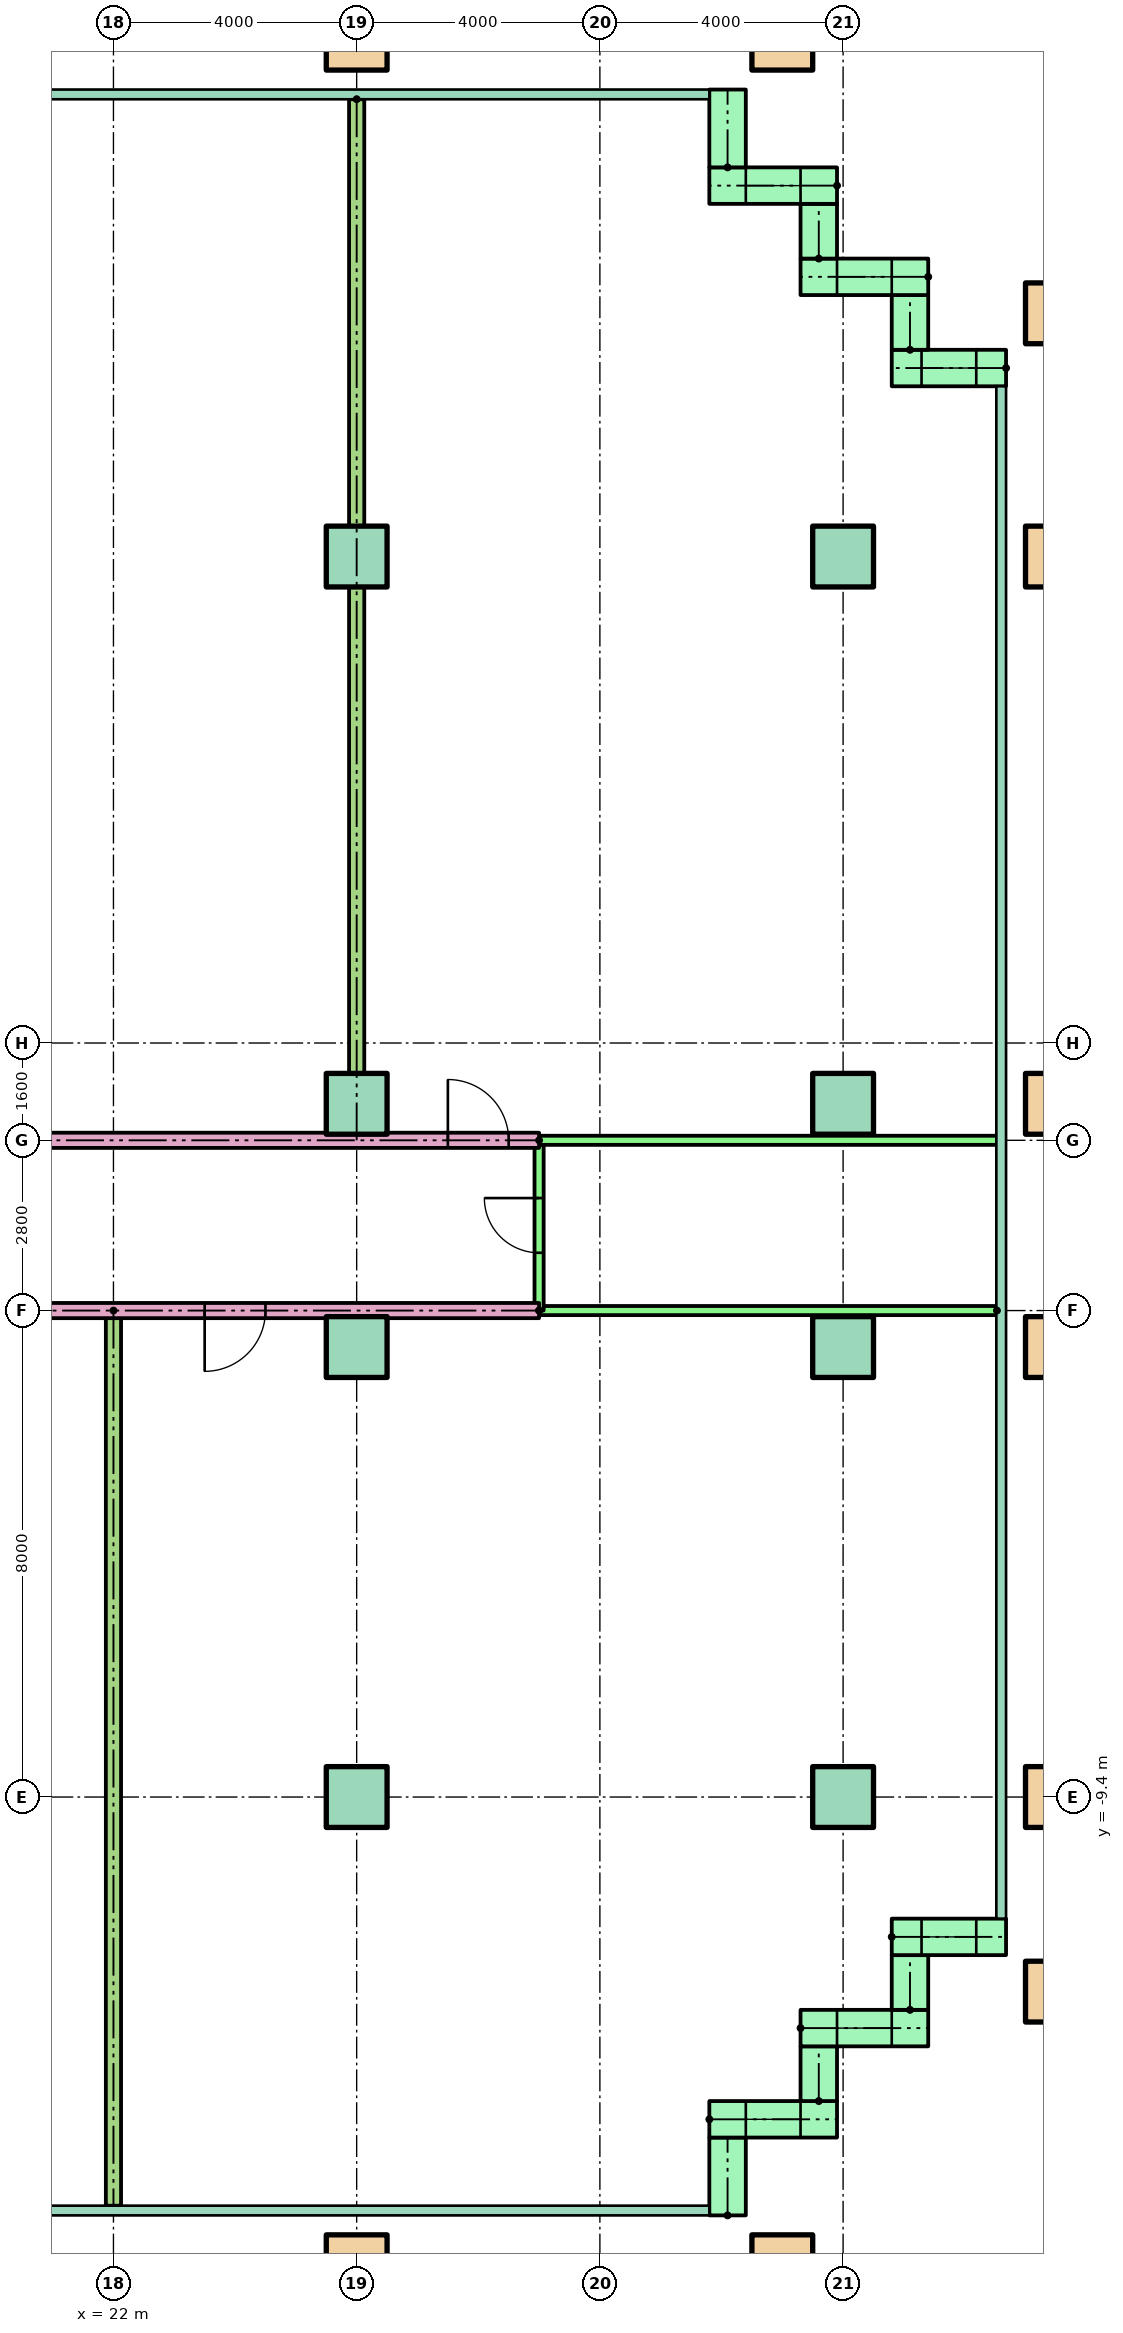
"""IFC4 building model, lengths in metres.
Left out: names, types, materials, properties, quantities, classifications, styles, units other than length and angle.
Written with IfcOpenShell. Run it as: python <this file> out.ifc"""

import sys

from ifc_helpers import new_model, si_unit, direction, frame, frame_2d, origin, origin_2d, place, context, subcontext, project, spatial, rectangle, hollow_rectangle, extrude, element, fill, save


model = new_model("IFC4")
c1 = context("Model", 3, precision=1e-05, world=origin(), true_north=direction((0.0, 1.0)))
c2 = subcontext(c1, "Body", "Model", "MODEL_VIEW")
j1 = project(units=[si_unit("LENGTHUNIT", "METRE"), si_unit("PLANEANGLEUNIT", "RADIAN")], contexts=[c1])
p1 = place(None, origin())
s1 = spatial("IfcSite", under=j1, at=p1, CompositionType="ELEMENT")
p2 = place(p1, origin())
s2 = spatial("IfcBuilding", under=s1, at=p2, CompositionType="ELEMENT")
p3 = place(p2, frame((0.0, 0.0, 29.9)))
s3 = spatial("IfcBuildingStorey", under=s2, at=p3, CompositionType="ELEMENT", Elevation=29.9)
for number, where in (
    (1, (26.0, -17.1, 0.0)),
    (2, (33.0, -17.1, 0.0)),
    (3, (37.5, -12.6, 0.0)),
):
    element("IfcColumn", number, at=place(p3, frame(where)), inside=s3, PredefinedType="COLUMN", context=c2, shape_type="SweptSolid", body=[
        extrude(hollow_rectangle(XDim=1.0, YDim=1.0, WallThickness=0.05, at=origin_2d()), origin(), (0.0, 0.0, 1.0), 3.9),
    ])
for number, where in (
    (4, (26.0, -9.4, 0.0)),
    (5, (34.0, -9.4, 0.0)),
):
    element("IfcColumn", number, at=place(p3, frame(where)), inside=s3, PredefinedType="COLUMN", context=c2, shape_type="SweptSolid", body=[
        extrude(rectangle(XDim=1.0, YDim=1.0, at=origin_2d()), origin(), (0.0, 0.0, 1.0), 3.9),
    ])
p4 = place(p3, frame((37.5, -9.4, 0.0)))
e6 = element("IfcColumn", 6, at=p4, inside=s3, PredefinedType="COLUMN", context=c2, shape_type="SweptSolid", body=[
    extrude(hollow_rectangle(XDim=1.0, YDim=1.0, WallThickness=0.05, at=origin_2d()), origin(), (0.0, 0.0, 1.0), 3.9),
])
for number, where in (
    (7, (26.0, -2.0, 0.0)),
    (8, (34.0, -2.0, 0.0)),
):
    element("IfcColumn", number, at=place(p3, frame(where)), inside=s3, PredefinedType="COLUMN", context=c2, shape_type="SweptSolid", body=[
        extrude(rectangle(XDim=1.0, YDim=1.0, at=origin_2d()), origin(), (0.0, 0.0, 1.0), 3.9),
    ])
p5 = place(p3, frame((37.5, -2.0, 0.0)))
e9 = element("IfcColumn", 9, at=p5, inside=s3, PredefinedType="COLUMN", context=c2, shape_type="SweptSolid", body=[
    extrude(hollow_rectangle(XDim=1.0, YDim=1.0, WallThickness=0.05, at=origin_2d()), origin(), (0.0, 0.0, 1.0), 3.9),
])
for number, where in (
    (10, (26.0, 2.0, 0.0)),
    (11, (34.0, 2.0, 0.0)),
):
    element("IfcColumn", number, at=place(p3, frame(where)), inside=s3, PredefinedType="COLUMN", context=c2, shape_type="SweptSolid", body=[
        extrude(rectangle(XDim=1.0, YDim=1.0, at=origin_2d()), origin(), (0.0, 0.0, 1.0), 3.9),
    ])
p6 = place(p3, frame((37.5, 2.0, 0.0)))
e12 = element("IfcColumn", 12, at=p6, inside=s3, PredefinedType="COLUMN", context=c2, shape_type="SweptSolid", body=[
    extrude(hollow_rectangle(XDim=1.0, YDim=1.0, WallThickness=0.05, at=origin_2d()), origin(), (0.0, 0.0, 1.0), 3.9),
])
for number, where in (
    (13, (26.0, 11.0, 0.0)),
    (14, (34.0, 11.0, 0.0)),
):
    element("IfcColumn", number, at=place(p3, frame(where)), inside=s3, PredefinedType="COLUMN", context=c2, shape_type="SweptSolid", body=[
        extrude(rectangle(XDim=1.0, YDim=1.0, at=origin_2d()), origin(), (0.0, 0.0, 1.0), 3.9),
    ])
for number, where in (
    (15, (37.5, 11.0, 0.0)),
    (16, (37.5, 15.0, 0.0)),
    (17, (26.0, 19.5, 0.0)),
    (18, (33.0, 19.5, 0.0)),
):
    element("IfcColumn", number, at=place(p3, frame(where)), inside=s3, PredefinedType="COLUMN", context=c2, shape_type="SweptSolid", body=[
        extrude(hollow_rectangle(XDim=1.0, YDim=1.0, WallThickness=0.05, at=origin_2d()), origin(), (0.0, 0.0, 1.0), 3.9),
    ])
p7 = place(p3, frame((36.68, 14.1, 0.0), z_axis=(0.0, 0.0, 1.0), x_axis=(-1.0, 0.0, 0.0)))
e19 = element("IfcWall", 19, at=p7, inside=s3, PredefinedType="STANDARD", context=c2, shape_type="SweptSolid", body=[
    extrude(rectangle(XDim=1.88, YDim=0.6, at=frame_2d((0.94, 0.0))), origin(), (0.0, 0.0, 1.0), 3.6),
])
p8 = place(p7, frame((0.49, 0.0, 0.9)))
e20 = element("IfcOpeningElement", 20, at=p8, cuts=e19, PredefinedType="OPENING", context=c2, shape_type="SweptSolid", body=[
    extrude(rectangle(XDim=0.9, YDim=1.8, at=frame_2d((0.45, 0.9))), frame((0.0, 0.31, 0.0), z_axis=(0.0, -1.0, 0.0), x_axis=(1.0, 0.0, 0.0)), (0.0, 0.0, 1.0), 0.62),
])
p9 = place(p3, frame((35.1, 14.4, 0.0), z_axis=(0.0, 0.0, 1.0), x_axis=(0.0, 1.0, 0.0)))
e21 = element("IfcWall", 21, at=p9, inside=s3, PredefinedType="STANDARD", context=c2, shape_type="SweptSolid", body=[
    extrude(rectangle(XDim=0.9, YDim=0.6, at=frame_2d((0.45, 0.0))), origin(), (0.0, 0.0, 1.0), 3.6),
])
p10 = place(p3, frame((35.4, 15.6, 0.0), z_axis=(0.0, 0.0, 1.0), x_axis=(-1.0, 0.0, 0.0)))
e22 = element("IfcWall", 22, at=p10, inside=s3, PredefinedType="STANDARD", context=c2, shape_type="SweptSolid", body=[
    extrude(rectangle(XDim=2.1, YDim=0.6, at=frame_2d((1.05, 0.0))), origin(), (0.0, 0.0, 1.0), 3.6),
])
p11 = place(p10, frame((0.6, 0.0, 0.9)))
e23 = element("IfcOpeningElement", 23, at=p11, cuts=e22, PredefinedType="OPENING", context=c2, shape_type="SweptSolid", body=[
    extrude(rectangle(XDim=0.9, YDim=1.8, at=frame_2d((0.45, 0.9))), frame((0.0, 0.31, 0.0), z_axis=(0.0, -1.0, 0.0), x_axis=(1.0, 0.0, 0.0)), (0.0, 0.0, 1.0), 0.62),
])
p12 = place(p3, frame((33.6, 15.9, 0.0), z_axis=(0.0, 0.0, 1.0), x_axis=(0.0, 1.0, 0.0)))
e24 = element("IfcWall", 24, at=p12, inside=s3, PredefinedType="STANDARD", context=c2, shape_type="SweptSolid", body=[
    extrude(rectangle(XDim=0.9, YDim=0.6, at=frame_2d((0.45, 0.0))), origin(), (0.0, 0.0, 1.0), 3.6),
])
p13 = place(p3, frame((33.9, 17.1, 0.0), z_axis=(0.0, 0.0, 1.0), x_axis=(-1.0, 0.0, 0.0)))
e25 = element("IfcWall", 25, at=p13, inside=s3, PredefinedType="STANDARD", context=c2, shape_type="SweptSolid", body=[
    extrude(rectangle(XDim=2.1, YDim=0.6, at=frame_2d((1.05, 0.0))), origin(), (0.0, 0.0, 1.0), 3.6),
])
p14 = place(p13, frame((0.6, 0.0, 0.9)))
e26 = element("IfcOpeningElement", 26, at=p14, cuts=e25, PredefinedType="OPENING", context=c2, shape_type="SweptSolid", body=[
    extrude(rectangle(XDim=0.9, YDim=1.8, at=frame_2d((0.45, 0.9))), frame((0.0, 0.31, 0.0), z_axis=(0.0, -1.0, 0.0), x_axis=(1.0, 0.0, 0.0)), (0.0, 0.0, 1.0), 0.62),
])
for number, where, z_axis, x_axis in (
    (27, (32.1, 17.4, 0.0), (0.0, 0.0, 1.0), (0.0, 1.0, 0.0)),
    (28, (32.1, -16.28, 0.0), (0.0, 0.0, 1.0), (0.0, 1.0, 0.0)),
):
    element("IfcWall", number, at=place(p3, frame(where, z_axis=z_axis, x_axis=x_axis)), inside=s3, PredefinedType="STANDARD", context=c2, shape_type="SweptSolid", body=[
        extrude(rectangle(XDim=1.28, YDim=0.6, at=frame_2d((0.64, 0.0))), origin(), (0.0, 0.0, 1.0), 3.6),
    ])
p15 = place(p3, frame((31.8, -14.7, 0.0)))
e29 = element("IfcWall", 29, at=p15, inside=s3, PredefinedType="STANDARD", context=c2, shape_type="SweptSolid", body=[
    extrude(rectangle(XDim=2.1, YDim=0.6, at=frame_2d((1.05, 0.0))), origin(), (0.0, 0.0, 1.0), 3.6),
])
p16 = place(p15, frame((0.6, 0.0, 0.9)))
e30 = element("IfcOpeningElement", 30, at=p16, cuts=e29, PredefinedType="OPENING", context=c2, shape_type="SweptSolid", body=[
    extrude(rectangle(XDim=0.9, YDim=1.8, at=frame_2d((0.45, 0.9))), frame((0.0, 0.31, 0.0), z_axis=(0.0, -1.0, 0.0), x_axis=(1.0, 0.0, 0.0)), (0.0, 0.0, 1.0), 0.62),
])
p17 = place(p3, frame((33.6, -14.4, 0.0), z_axis=(0.0, 0.0, 1.0), x_axis=(0.0, 1.0, 0.0)))
e31 = element("IfcWall", 31, at=p17, inside=s3, PredefinedType="STANDARD", context=c2, shape_type="SweptSolid", body=[
    extrude(rectangle(XDim=0.9, YDim=0.6, at=frame_2d((0.45, 0.0))), origin(), (0.0, 0.0, 1.0), 3.6),
])
p18 = place(p3, frame((33.3, -13.2, 0.0)))
e32 = element("IfcWall", 32, at=p18, inside=s3, PredefinedType="STANDARD", context=c2, shape_type="SweptSolid", body=[
    extrude(rectangle(XDim=2.1, YDim=0.6, at=frame_2d((1.05, 0.0))), origin(), (0.0, 0.0, 1.0), 3.6),
])
p19 = place(p18, frame((0.6, 0.0, 0.9)))
e33 = element("IfcOpeningElement", 33, at=p19, cuts=e32, PredefinedType="OPENING", context=c2, shape_type="SweptSolid", body=[
    extrude(rectangle(XDim=0.9, YDim=1.8, at=frame_2d((0.45, 0.9))), frame((0.0, 0.31, 0.0), z_axis=(0.0, -1.0, 0.0), x_axis=(1.0, 0.0, 0.0)), (0.0, 0.0, 1.0), 0.62),
])
p20 = place(p3, frame((35.1, -12.9, 0.0), z_axis=(0.0, 0.0, 1.0), x_axis=(0.0, 1.0, 0.0)))
e34 = element("IfcWall", 34, at=p20, inside=s3, PredefinedType="STANDARD", context=c2, shape_type="SweptSolid", body=[
    extrude(rectangle(XDim=0.9, YDim=0.6, at=frame_2d((0.45, 0.0))), origin(), (0.0, 0.0, 1.0), 3.6),
])
p21 = place(p3, frame((34.8, -11.7, 0.0)))
e35 = element("IfcWall", 35, at=p21, inside=s3, PredefinedType="STANDARD", context=c2, shape_type="SweptSolid", body=[
    extrude(rectangle(XDim=1.88, YDim=0.6, at=frame_2d((0.94, 0.0))), origin(), (0.0, 0.0, 1.0), 3.6),
])
p22 = place(p21, frame((0.49, 0.0, 0.9)))
e36 = element("IfcOpeningElement", 36, at=p22, cuts=e35, PredefinedType="OPENING", context=c2, shape_type="SweptSolid", body=[
    extrude(rectangle(XDim=0.9, YDim=1.8, at=frame_2d((0.45, 0.9))), frame((0.0, 0.31, 0.0), z_axis=(0.0, -1.0, 0.0), x_axis=(1.0, 0.0, 0.0)), (0.0, 0.0, 1.0), 0.62),
])
p23 = place(p3, frame((29.0, -1.4, 0.0), z_axis=(0.0, 0.0, 1.0), x_axis=(-1.0, 0.0, 0.0)))
e37 = element("IfcWall", 37, at=p23, inside=s3, PredefinedType="PARTITIONING", context=c2, shape_type="SweptSolid", body=[
    extrude(rectangle(XDim=15.0, YDim=0.25, at=frame_2d((7.5, 0.0))), origin(), (0.0, 0.0, 1.0), 3.1),
])
p24 = place(p23, frame((12.5, 0.0, 0.0)))
e38 = element("IfcOpeningElement", 38, at=p24, cuts=e37, PredefinedType="OPENING", context=c2, shape_type="SweptSolid", body=[
    extrude(rectangle(XDim=1.0, YDim=2.1, at=frame_2d((0.5, 1.05))), frame((0.0, 0.135, 0.0), z_axis=(0.0, -1.0, 0.0), x_axis=(1.0, 0.0, 0.0)), (0.0, 0.0, 1.0), 0.27),
])
p25 = place(p23, frame((4.5, 0.0, 0.0)))
e39 = element("IfcOpeningElement", 39, at=p25, cuts=e37, PredefinedType="OPENING", context=c2, shape_type="SweptSolid", body=[
    extrude(rectangle(XDim=1.0, YDim=2.1, at=frame_2d((0.5, 1.05))), frame((0.0, 0.135, 0.0), z_axis=(0.0, -1.0, 0.0), x_axis=(1.0, 0.0, 0.0)), (0.0, 0.0, 1.0), 0.27),
])
p26 = place(p3, frame((36.53, -1.4, 0.0), z_axis=(0.0, 0.0, 1.0), x_axis=(-1.0, 0.0, 0.0)))
e40 = element("IfcWall", 40, at=p26, inside=s3, PredefinedType="PARTITIONING", context=c2, shape_type="SweptSolid", body=[
    extrude(rectangle(XDim=7.53, YDim=0.15, at=frame_2d((3.765, 0.0))), origin(), (0.0, 0.0, 1.0), 3.1),
])
p27 = place(p3, frame((29.0, -1.4, 0.0), z_axis=(0.0, 0.0, 1.0), x_axis=(0.0, 1.0, 0.0)))
e41 = element("IfcWall", 41, at=p27, inside=s3, PredefinedType="PARTITIONING", context=c2, shape_type="SweptSolid", body=[
    extrude(rectangle(XDim=2.8, YDim=0.15, at=frame_2d((1.4, 0.0))), origin(), (0.0, 0.0, 1.0), 3.1),
])
p28 = place(p27, frame((0.95, 0.0, 0.0)))
e42 = element("IfcOpeningElement", 42, at=p28, cuts=e41, PredefinedType="OPENING", context=c2, shape_type="SweptSolid", body=[
    extrude(rectangle(XDim=0.9, YDim=2.1, at=frame_2d((0.45, 1.05))), frame((0.0, 0.085, 0.0), z_axis=(0.0, -1.0, 0.0), x_axis=(1.0, 0.0, 0.0)), (0.0, 0.0, 1.0), 0.17),
])
p29 = place(p3, frame((22.0, -1.4, 0.0), z_axis=(0.0, 0.0, 1.0), x_axis=(0.0, -1.0, 0.0)))
e43 = element("IfcWall", 43, at=p29, inside=s3, PredefinedType="PARTITIONING", context=c2, shape_type="SweptSolid", body=[
    extrude(rectangle(XDim=14.721, YDim=0.25, at=frame_2d((7.361, 0.0))), origin(), (0.0, 0.0, 1.0), 3.1),
])
p30 = place(p3, frame((14.0, 1.4, 0.0)))
e44 = element("IfcWall", 44, at=p30, inside=s3, PredefinedType="PARTITIONING", context=c2, shape_type="SweptSolid", body=[
    extrude(rectangle(XDim=15.0, YDim=0.25, at=frame_2d((7.5, 0.0))), origin(), (0.0, 0.0, 1.0), 3.1),
])
p31 = place(p30, frame((0.3, 0.0, 0.0)))
e45 = element("IfcOpeningElement", 45, at=p31, cuts=e44, PredefinedType="OPENING", context=c2, shape_type="SweptSolid", body=[
    extrude(rectangle(XDim=1.0, YDim=2.1, at=frame_2d((0.5, 1.05))), frame((0.0, 0.135, 0.0), z_axis=(0.0, -1.0, 0.0), x_axis=(1.0, 0.0, 0.0)), (0.0, 0.0, 1.0), 0.27),
])
p32 = place(p30, frame((5.5, 0.0, 0.0)))
e46 = element("IfcOpeningElement", 46, at=p32, cuts=e44, PredefinedType="OPENING", context=c2, shape_type="SweptSolid", body=[
    extrude(rectangle(XDim=1.0, YDim=2.1, at=frame_2d((0.5, 1.05))), frame((0.0, 0.135, 0.0), z_axis=(0.0, -1.0, 0.0), x_axis=(1.0, 0.0, 0.0)), (0.0, 0.0, 1.0), 0.27),
])
p33 = place(p30, frame((13.5, 0.0, 0.0)))
e47 = element("IfcOpeningElement", 47, at=p33, cuts=e44, PredefinedType="OPENING", context=c2, shape_type="SweptSolid", body=[
    extrude(rectangle(XDim=1.0, YDim=2.1, at=frame_2d((0.5, 1.05))), frame((0.0, 0.135, 0.0), z_axis=(0.0, -1.0, 0.0), x_axis=(1.0, 0.0, 0.0)), (0.0, 0.0, 1.0), 0.27),
])
p34 = place(p3, frame((29.0, 1.4, 0.0)))
e48 = element("IfcWall", 48, at=p34, inside=s3, PredefinedType="PARTITIONING", context=c2, shape_type="SweptSolid", body=[
    extrude(rectangle(XDim=7.53, YDim=0.15, at=frame_2d((3.765, 0.0))), origin(), (0.0, 0.0, 1.0), 3.1),
])
p35 = place(p3, frame((26.0, 18.521, 0.0), z_axis=(0.0, 0.0, 1.0), x_axis=(0.0, -1.0, 0.0)))
e49 = element("IfcWall", 49, at=p35, inside=s3, PredefinedType="PARTITIONING", context=c2, shape_type="SweptSolid", body=[
    extrude(rectangle(XDim=17.121, YDim=0.25, at=frame_2d((8.561, 0.0))), origin(), (0.0, 0.0, 1.0), 3.1),
])
p36 = place(p8, origin())
e50 = element("IfcWindow", 50, at=p36, inside=s3, PartitioningType="SINGLE_PANEL", PredefinedType="WINDOW", context=c2, shape_type="SweptSolid", body=[
    extrude(rectangle(XDim=0.9, YDim=1.8, at=frame_2d((0.45, 0.9))), frame((0.0, 0.03, 0.0), z_axis=(0.0, -1.0, 0.0), x_axis=(1.0, 0.0, 0.0)), (0.0, 0.0, 1.0), 0.06),
])
fill(e20, e50)
p37 = place(p11, origin())
e51 = element("IfcWindow", 51, at=p37, inside=s3, PartitioningType="SINGLE_PANEL", PredefinedType="WINDOW", context=c2, shape_type="SweptSolid", body=[
    extrude(rectangle(XDim=0.9, YDim=1.8, at=frame_2d((0.45, 0.9))), frame((0.0, 0.03, 0.0), z_axis=(0.0, -1.0, 0.0), x_axis=(1.0, 0.0, 0.0)), (0.0, 0.0, 1.0), 0.06),
])
fill(e23, e51)
p38 = place(p14, origin())
e52 = element("IfcWindow", 52, at=p38, inside=s3, PartitioningType="SINGLE_PANEL", PredefinedType="WINDOW", context=c2, shape_type="SweptSolid", body=[
    extrude(rectangle(XDim=0.9, YDim=1.8, at=frame_2d((0.45, 0.9))), frame((0.0, 0.03, 0.0), z_axis=(0.0, -1.0, 0.0), x_axis=(1.0, 0.0, 0.0)), (0.0, 0.0, 1.0), 0.06),
])
fill(e26, e52)
p39 = place(p16, origin())
e53 = element("IfcWindow", 53, at=p39, inside=s3, PartitioningType="SINGLE_PANEL", PredefinedType="WINDOW", context=c2, shape_type="SweptSolid", body=[
    extrude(rectangle(XDim=0.9, YDim=1.8, at=frame_2d((0.45, 0.9))), frame((0.0, 0.03, 0.0), z_axis=(0.0, -1.0, 0.0), x_axis=(1.0, 0.0, 0.0)), (0.0, 0.0, 1.0), 0.06),
])
fill(e30, e53)
p40 = place(p19, origin())
e54 = element("IfcWindow", 54, at=p40, inside=s3, PartitioningType="SINGLE_PANEL", PredefinedType="WINDOW", context=c2, shape_type="SweptSolid", body=[
    extrude(rectangle(XDim=0.9, YDim=1.8, at=frame_2d((0.45, 0.9))), frame((0.0, 0.03, 0.0), z_axis=(0.0, -1.0, 0.0), x_axis=(1.0, 0.0, 0.0)), (0.0, 0.0, 1.0), 0.06),
])
fill(e33, e54)
p41 = place(p22, origin())
e55 = element("IfcWindow", 55, at=p41, inside=s3, PartitioningType="SINGLE_PANEL", PredefinedType="WINDOW", context=c2, shape_type="SweptSolid", body=[
    extrude(rectangle(XDim=0.9, YDim=1.8, at=frame_2d((0.45, 0.9))), frame((0.0, 0.03, 0.0), z_axis=(0.0, -1.0, 0.0), x_axis=(1.0, 0.0, 0.0)), (0.0, 0.0, 1.0), 0.06),
])
fill(e36, e55)
p42 = place(p25, origin())
e56 = element("IfcDoor", 56, at=p42, inside=s3, OperationType="SINGLE_SWING_RIGHT", PredefinedType="DOOR", context=c2, shape_type="SweptSolid", body=[
    extrude(rectangle(XDim=1.0, YDim=2.1, at=frame_2d((0.5, 1.05))), frame((0.0, 0.025, 0.0), z_axis=(0.0, -1.0, 0.0), x_axis=(1.0, 0.0, 0.0)), (0.0, 0.0, 1.0), 0.05),
])
fill(e39, e56)
p43 = place(p28, origin())
e57 = element("IfcDoor", 57, at=p43, inside=s3, OperationType="SINGLE_SWING_RIGHT", PredefinedType="DOOR", context=c2, shape_type="SweptSolid", body=[
    extrude(rectangle(XDim=0.9, YDim=2.1, at=frame_2d((0.45, 1.05))), frame((0.0, 0.025, 0.0), z_axis=(0.0, -1.0, 0.0), x_axis=(1.0, 0.0, 0.0)), (0.0, 0.0, 1.0), 0.05),
])
fill(e42, e57)
p44 = place(p33, origin())
e58 = element("IfcDoor", 58, at=p44, inside=s3, OperationType="SINGLE_SWING_LEFT", PredefinedType="DOOR", context=c2, shape_type="SweptSolid", body=[
    extrude(rectangle(XDim=1.0, YDim=2.1, at=frame_2d((0.5, 1.05))), frame((0.0, 0.025, 0.0), z_axis=(0.0, -1.0, 0.0), x_axis=(1.0, 0.0, 0.0)), (0.0, 0.0, 1.0), 0.05),
])
fill(e47, e58)
save(model, sys.argv[1])
